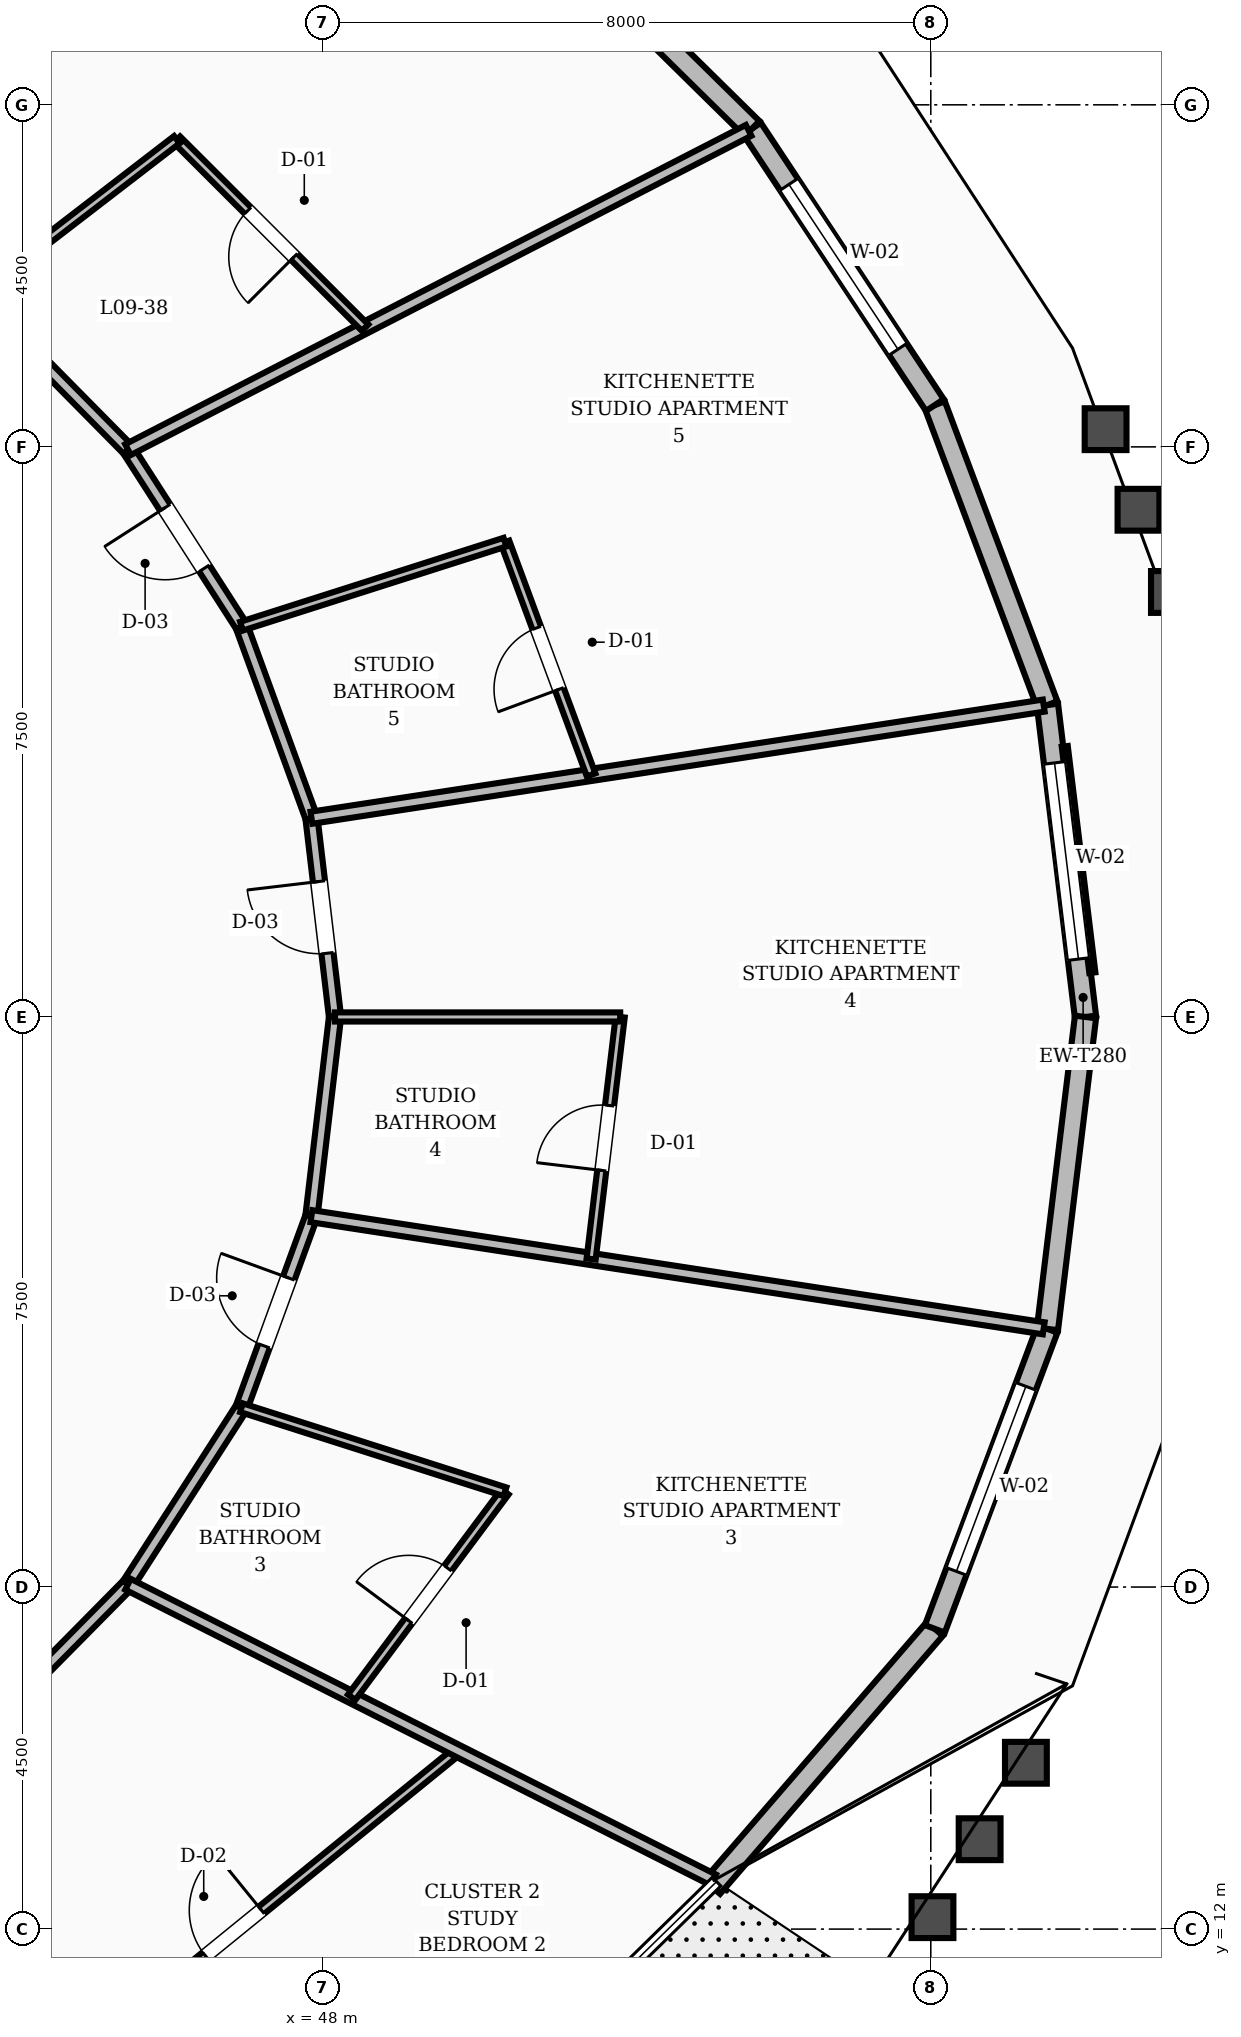
"""IFC4 building model, lengths in metres.
Left out: names, types, materials, properties, quantities, classifications, styles, units other than length and angle.
Written with IfcOpenShell. Run it as: python <this file> out.ifc"""

import sys

from ifc_helpers import new_model, si_unit, direction, frame, frame_2d, origin, place, context, subcontext, project, spatial, rectangle, extrude, element, fill, save


model = new_model("IFC4")
c1 = context("Model", 3, precision=1e-05, world=origin(), true_north=direction((0.0, 1.0)))
c2 = subcontext(c1, "Body", "Model", "MODEL_VIEW")
j1 = project(units=[si_unit("LENGTHUNIT", "METRE"), si_unit("PLANEANGLEUNIT", "RADIAN")], contexts=[c1])
p1 = place(None, origin())
s1 = spatial("IfcSite", under=j1, at=p1, CompositionType="ELEMENT")
p2 = place(p1, origin())
s2 = spatial("IfcBuilding", under=s1, at=p2, CompositionType="ELEMENT")
p3 = place(p2, frame((0.0, 0.0, 41.2)))
s3 = spatial("IfcBuildingStorey", under=s2, at=p3, CompositionType="ELEMENT", Elevation=41.2)
p4 = place(p3, frame((58.035, 24.0, 0.0), z_axis=(0.0, 0.0, 1.0), x_axis=(-0.121003282019, 0.992652107105, 0.0)))
e1 = element("IfcWall", 1, at=p4, inside=s3, PredefinedType="STANDARD", context=c2, shape_type="SweptSolid", body=[
    extrude(rectangle(XDim=4.134, YDim=0.28, at=frame_2d((2.067, 0.0))), origin(), (0.0, 0.0, 1.0), 2.65),
])
p5 = place(p4, frame((0.767, 0.0, 0.8)))
e2 = element("IfcOpeningElement", 2, at=p5, cuts=e1, PredefinedType="OPENING", context=c2, shape_type="SweptSolid", body=[
    extrude(rectangle(XDim=2.6, YDim=1.65, at=frame_2d((1.3, 0.825))), frame((0.0, 0.15, 0.0), z_axis=(0.0, -1.0, 0.0), x_axis=(1.0, 0.0, 0.0)), (0.0, 0.0, 1.0), 0.3),
])
p6 = place(p3, frame((57.535, 28.104, 0.0), z_axis=(0.0, 0.0, 1.0), x_axis=(-0.351472537915, 0.936198192207, 0.0)))
e3 = element("IfcWall", 3, at=p6, inside=s3, PredefinedType="STANDARD", context=c2, shape_type="SweptSolid", body=[
    extrude(rectangle(XDim=4.215, YDim=0.28, at=frame_2d((2.107, 0.0))), origin(), (0.0, 0.0, 1.0), 2.65),
])
p7 = place(p3, frame((56.054, 32.05, 0.0), z_axis=(0.0, 0.0, 1.0), x_axis=(-0.551763829148, 0.834000405782, 0.0)))
e4 = element("IfcWall", 4, at=p7, inside=s3, PredefinedType="STANDARD", context=c2, shape_type="SweptSolid", body=[
    extrude(rectangle(XDim=4.361, YDim=0.28, at=frame_2d((2.18, 0.0))), origin(), (0.0, 0.0, 1.0), 2.65),
])
p8 = place(p7, frame((0.88, 0.0, 0.8)))
e5 = element("IfcOpeningElement", 5, at=p8, cuts=e4, PredefinedType="OPENING", context=c2, shape_type="SweptSolid", body=[
    extrude(rectangle(XDim=2.6, YDim=1.65, at=frame_2d((1.3, 0.825))), frame((0.0, 0.15, 0.0), z_axis=(0.0, -1.0, 0.0), x_axis=(1.0, 0.0, 0.0)), (0.0, 0.0, 1.0), 0.3),
])
p9 = place(p3, frame((53.648, 35.687, 0.0), z_axis=(0.0, 0.0, 1.0), x_axis=(-0.712592855148, 0.701577809506, 0.0)))
e6 = element("IfcWall", 6, at=p9, inside=s3, PredefinedType="STANDARD", context=c2, shape_type="SweptSolid", body=[
    extrude(rectangle(XDim=4.544, YDim=0.28, at=frame_2d((2.272, 0.0))), origin(), (0.0, 0.0, 1.0), 2.65),
])
p10 = place(p3, frame((53.122, 12.555, 0.0), z_axis=(0.0, 0.0, 1.0), x_axis=(0.653570276047, 0.756865836372, 0.0)))
e7 = element("IfcWall", 7, at=p10, inside=s3, PredefinedType="STANDARD", context=c2, shape_type="SweptSolid", body=[
    extrude(rectangle(XDim=4.486, YDim=0.28, at=frame_2d((2.243, 0.0))), origin(), (0.0, 0.0, 1.0), 2.65),
])
p11 = place(p3, frame((56.054, 15.95, 0.0), z_axis=(0.0, 0.0, 1.0), x_axis=(0.351472537915, 0.936198192207, 0.0)))
e8 = element("IfcWall", 8, at=p11, inside=s3, PredefinedType="STANDARD", context=c2, shape_type="SweptSolid", body=[
    extrude(rectangle(XDim=4.215, YDim=0.28, at=frame_2d((2.107, 0.0))), origin(), (0.0, 0.0, 1.0), 2.65),
])
p12 = place(p11, frame((0.808, 0.0, 0.8)))
e9 = element("IfcOpeningElement", 9, at=p12, cuts=e8, PredefinedType="OPENING", context=c2, shape_type="SweptSolid", body=[
    extrude(rectangle(XDim=2.6, YDim=1.65, at=frame_2d((1.3, 0.825))), frame((0.0, 0.15, 0.0), z_axis=(0.0, -1.0, 0.0), x_axis=(1.0, 0.0, 0.0)), (0.0, 0.0, 1.0), 0.3),
])
p13 = place(p3, frame((57.535, 19.896, 0.0), z_axis=(0.0, 0.0, 1.0), x_axis=(0.121003282019, 0.992652107105, 0.0)))
e10 = element("IfcWall", 10, at=p13, inside=s3, PredefinedType="STANDARD", context=c2, shape_type="SweptSolid", body=[
    extrude(rectangle(XDim=4.134, YDim=0.28, at=frame_2d((2.067, 0.0))), origin(), (0.0, 0.0, 1.0), 2.65),
])
p14 = place(p3, frame((48.162, 24.0, 0.0), z_axis=(0.0, 0.0, 1.0), x_axis=(-0.117667763342, 0.993053018459, 0.0)))
e11 = element("IfcWall", 11, at=p14, inside=s3, PredefinedType="SOLIDWALL", context=c2, shape_type="SweptSolid", body=[
    extrude(rectangle(XDim=2.639, YDim=0.16, at=frame_2d((1.32, 0.0))), origin(), (0.0, 0.0, 1.0), 2.61),
])
p15 = place(p14, frame((0.844, 0.0, 0.0)))
e12 = element("IfcOpeningElement", 12, at=p15, cuts=e11, PredefinedType="OPENING", context=c2, shape_type="SweptSolid", body=[
    extrude(rectangle(XDim=0.95, YDim=2.1, at=frame_2d((0.475, 1.05))), frame((0.0, 0.09, 0.0), z_axis=(0.0, -1.0, 0.0), x_axis=(1.0, 0.0, 0.0)), (0.0, 0.0, 1.0), 0.18),
])
p16 = place(p3, frame((47.852, 26.621, 0.0), z_axis=(0.0, 0.0, 1.0), x_axis=(-0.342882618672, 0.939378257047, 0.0)))
e13 = element("IfcWall", 13, at=p16, inside=s3, PredefinedType="SOLIDWALL", context=c2, shape_type="SweptSolid", body=[
    extrude(rectangle(XDim=2.683, YDim=0.16, at=frame_2d((1.341, 0.0))), origin(), (0.0, 0.0, 1.0), 2.61),
])
p17 = place(p3, frame((46.932, 29.141, 0.0), z_axis=(0.0, 0.0, 1.0), x_axis=(-0.540891657444, 0.841092274907, 0.0)))
e14 = element("IfcWall", 14, at=p17, inside=s3, PredefinedType="SOLIDWALL", context=c2, shape_type="SweptSolid", body=[
    extrude(rectangle(XDim=2.761, YDim=0.16, at=frame_2d((1.38, 0.0))), origin(), (0.0, 0.0, 1.0), 2.61),
])
p18 = place(p17, frame((0.906, 0.0, 0.0)))
e15 = element("IfcOpeningElement", 15, at=p18, cuts=e14, PredefinedType="OPENING", context=c2, shape_type="SweptSolid", body=[
    extrude(rectangle(XDim=0.95, YDim=2.1, at=frame_2d((0.475, 1.05))), frame((0.0, 0.09, 0.0), z_axis=(0.0, -1.0, 0.0), x_axis=(1.0, 0.0, 0.0)), (0.0, 0.0, 1.0), 0.18),
])
for number, where, z_axis, x_axis in (
    (16, (45.438, 31.463, 0.0), (0.0, 0.0, 1.0), (-0.703, 0.712, 0.0)),
    (17, (43.428, 14.501, 0.0), (0.0, 0.0, 1.0), (0.703, 0.712, 0.0)),
):
    element("IfcWall", number, at=place(p3, frame(where, z_axis=z_axis, x_axis=x_axis)), inside=s3, PredefinedType="SOLIDWALL", context=c2, shape_type="SweptSolid", body=[
        extrude(rectangle(XDim=2.861, YDim=0.16, at=frame_2d((1.43, 0.0))), origin(), (0.0, 0.0, 1.0), 2.61),
    ])
p19 = place(p3, frame((45.438, 16.537, 0.0), z_axis=(0.0, 0.0, 1.0), x_axis=(0.540891657444, 0.841092274907, 0.0)))
e18 = element("IfcWall", 18, at=p19, inside=s3, PredefinedType="SOLIDWALL", context=c2, shape_type="SweptSolid", body=[
    extrude(rectangle(XDim=2.761, YDim=0.16, at=frame_2d((1.38, 0.0))), origin(), (0.0, 0.0, 1.0), 2.61),
])
p20 = place(p3, frame((46.932, 18.859, 0.0), z_axis=(0.0, 0.0, 1.0), x_axis=(0.342882618672, 0.939378257047, 0.0)))
e19 = element("IfcWall", 19, at=p20, inside=s3, PredefinedType="SOLIDWALL", context=c2, shape_type="SweptSolid", body=[
    extrude(rectangle(XDim=2.683, YDim=0.16, at=frame_2d((1.341, 0.0))), origin(), (0.0, 0.0, 1.0), 2.61),
])
p21 = place(p20, frame((0.866, 0.0, 0.0)))
e20 = element("IfcOpeningElement", 20, at=p21, cuts=e19, PredefinedType="OPENING", context=c2, shape_type="SweptSolid", body=[
    extrude(rectangle(XDim=0.95, YDim=2.1, at=frame_2d((0.475, 1.05))), frame((0.0, 0.09, 0.0), z_axis=(0.0, -1.0, 0.0), x_axis=(1.0, 0.0, 0.0)), (0.0, 0.0, 1.0), 0.18),
])
p22 = place(p3, frame((47.852, 21.379, 0.0), z_axis=(0.0, 0.0, 1.0), x_axis=(0.117667763342, 0.993053018459, 0.0)))
e21 = element("IfcWall", 21, at=p22, inside=s3, PredefinedType="SOLIDWALL", context=c2, shape_type="SweptSolid", body=[
    extrude(rectangle(XDim=2.639, YDim=0.16, at=frame_2d((1.32, 0.0))), origin(), (0.0, 0.0, 1.0), 2.61),
])
p23 = place(p3, frame((43.877, 9.552, 0.0), z_axis=(0.0, 0.0, 1.0), x_axis=(0.775978393893, 0.630759488404, 0.0)))
e22 = element("IfcWall", 22, at=p23, inside=s3, PredefinedType="PARTITIONING", context=c2, shape_type="SweptSolid", body=[
    extrude(rectangle(XDim=7.601, YDim=0.12, at=frame_2d((3.8, 0.0))), origin(), (0.0, 0.0, 1.0), 2.61),
])
p24 = place(p23, frame((3.325, 0.0, 0.0)))
e23 = element("IfcOpeningElement", 23, at=p24, cuts=e22, PredefinedType="OPENING", context=c2, shape_type="SweptSolid", body=[
    extrude(rectangle(XDim=0.95, YDim=2.1, at=frame_2d((0.475, 1.05))), frame((0.0, 0.07, 0.0), z_axis=(0.0, -1.0, 0.0), x_axis=(1.0, 0.0, 0.0)), (0.0, 0.0, 1.0), 0.14),
])
p25 = place(p3, frame((45.438, 16.537, 0.0), z_axis=(0.0, 0.0, 1.0), x_axis=(0.892562807144, -0.450923092448, 0.0)))
e24 = element("IfcWall", 24, at=p25, inside=s3, PredefinedType="SOLIDWALL", context=c2, shape_type="SweptSolid", body=[
    extrude(rectangle(XDim=8.626, YDim=0.16, at=frame_2d((4.313, 0.0))), origin(), (0.0, 0.0, 1.0), 2.61),
])
p26 = place(p3, frame((48.381, 15.05, 0.0), z_axis=(0.0, 0.0, 1.0), x_axis=(0.597948418231, 0.801534583867, 0.0)))
e25 = element("IfcWall", 25, at=p26, inside=s3, PredefinedType="PARTITIONING", context=c2, shape_type="SweptSolid", body=[
    extrude(rectangle(XDim=3.373, YDim=0.12, at=frame_2d((1.687, 0.0))), origin(), (0.0, 0.0, 1.0), 2.61),
])
p27 = place(p26, frame((1.257, 0.0, 0.0)))
e26 = element("IfcOpeningElement", 26, at=p27, cuts=e25, PredefinedType="OPENING", context=c2, shape_type="SweptSolid", body=[
    extrude(rectangle(XDim=0.86, YDim=2.1, at=frame_2d((0.43, 1.05))), frame((0.0, 0.07, 0.0), z_axis=(0.0, -1.0, 0.0), x_axis=(1.0, 0.0, 0.0)), (0.0, 0.0, 1.0), 0.14),
])
p28 = place(p3, frame((46.932, 18.859, 0.0), z_axis=(0.0, 0.0, 1.0), x_axis=(0.952742297431, -0.303779714077, 0.0)))
e27 = element("IfcWall", 27, at=p28, inside=s3, PredefinedType="PARTITIONING", context=c2, shape_type="SweptSolid", body=[
    extrude(rectangle(XDim=3.638, YDim=0.12, at=frame_2d((1.819, 0.0))), origin(), (0.0, 0.0, 1.0), 2.61),
])
p29 = place(p3, frame((47.852, 21.379, 0.0), z_axis=(0.0, 0.0, 1.0), x_axis=(0.988476582303, -0.151373862468, 0.0)))
e28 = element("IfcWall", 28, at=p29, inside=s3, PredefinedType="SOLIDWALL", context=c2, shape_type="SweptSolid", body=[
    extrude(rectangle(XDim=9.746, YDim=0.16, at=frame_2d((4.873, 0.0))), origin(), (0.0, 0.0, 1.0), 2.61),
])
p30 = place(p3, frame((51.531, 20.816, 0.0), z_axis=(0.0, 0.0, 1.0), x_axis=(0.11928329579, 0.992860259727, 0.0)))
e29 = element("IfcWall", 29, at=p30, inside=s3, PredefinedType="PARTITIONING", context=c2, shape_type="SweptSolid", body=[
    extrude(rectangle(XDim=3.207, YDim=0.12, at=frame_2d((1.604, 0.0))), origin(), (0.0, 0.0, 1.0), 2.61),
])
p31 = place(p30, frame((1.174, 0.0, 0.0)))
e30 = element("IfcOpeningElement", 30, at=p31, cuts=e29, PredefinedType="OPENING", context=c2, shape_type="SweptSolid", body=[
    extrude(rectangle(XDim=0.86, YDim=2.1, at=frame_2d((0.43, 1.05))), frame((0.0, 0.07, 0.0), z_axis=(0.0, -1.0, 0.0), x_axis=(1.0, 0.0, 0.0)), (0.0, 0.0, 1.0), 0.14),
])
p32 = place(p3, frame((48.162, 24.0, 0.0), z_axis=(0.0, 0.0, 1.0), x_axis=(1.0, 0.0, 0.0)))
e31 = element("IfcWall", 31, at=p32, inside=s3, PredefinedType="PARTITIONING", context=c2, shape_type="SweptSolid", body=[
    extrude(rectangle(XDim=3.752, YDim=0.12, at=frame_2d((1.876, 0.0))), origin(), (0.0, 0.0, 1.0), 2.61),
])
p33 = place(p3, frame((47.852, 26.621, 0.0), z_axis=(0.0, 0.0, 1.0), x_axis=(0.988476582303, 0.151373862468, 0.0)))
e32 = element("IfcWall", 32, at=p33, inside=s3, PredefinedType="SOLIDWALL", context=c2, shape_type="SweptSolid", body=[
    extrude(rectangle(XDim=9.746, YDim=0.16, at=frame_2d((4.873, 0.0))), origin(), (0.0, 0.0, 1.0), 2.61),
])
p34 = place(p3, frame((51.531, 27.184, 0.0), z_axis=(0.0, 0.0, 1.0), x_axis=(-0.347104905391, 0.937826308361, 0.0)))
e33 = element("IfcWall", 33, at=p34, inside=s3, PredefinedType="PARTITIONING", context=c2, shape_type="SweptSolid", body=[
    extrude(rectangle(XDim=3.265, YDim=0.12, at=frame_2d((1.632, 0.0))), origin(), (0.0, 0.0, 1.0), 2.61),
])
p35 = place(p34, frame((1.203, 0.0, 0.0)))
e34 = element("IfcOpeningElement", 34, at=p35, cuts=e33, PredefinedType="OPENING", context=c2, shape_type="SweptSolid", body=[
    extrude(rectangle(XDim=0.86, YDim=2.1, at=frame_2d((0.43, 1.05))), frame((0.0, 0.07, 0.0), z_axis=(0.0, -1.0, 0.0), x_axis=(1.0, 0.0, 0.0)), (0.0, 0.0, 1.0), 0.14),
])
p36 = place(p3, frame((46.932, 29.141, 0.0), z_axis=(0.0, 0.0, 1.0), x_axis=(0.952742297431, 0.303779714077, 0.0)))
e35 = element("IfcWall", 35, at=p36, inside=s3, PredefinedType="PARTITIONING", context=c2, shape_type="SweptSolid", body=[
    extrude(rectangle(XDim=3.638, YDim=0.12, at=frame_2d((1.819, 0.0))), origin(), (0.0, 0.0, 1.0), 2.61),
])
p37 = place(p3, frame((45.438, 31.463, 0.0), z_axis=(0.0, 0.0, 1.0), x_axis=(0.889225689498, 0.45746876739, 0.0)))
e36 = element("IfcWall", 36, at=p37, inside=s3, PredefinedType="SOLIDWALL", context=c2, shape_type="SweptSolid", body=[
    extrude(rectangle(XDim=9.182, YDim=0.16, at=frame_2d((4.591, 0.0))), origin(), (0.0, 0.0, 1.0), 2.61),
])
p38 = place(p3, frame((48.558, 33.068, 0.0), z_axis=(0.0, 0.0, 1.0), x_axis=(-0.707560021101, 0.706653250569, 0.0)))
e37 = element("IfcWall", 37, at=p38, inside=s3, PredefinedType="PARTITIONING", context=c2, shape_type="SweptSolid", body=[
    extrude(rectangle(XDim=3.5, YDim=0.12, at=frame_2d((1.75, 0.0))), origin(), (0.0, 0.0, 1.0), 2.61),
])
p39 = place(p38, frame((1.32, 0.0, 0.0)))
e38 = element("IfcOpeningElement", 38, at=p39, cuts=e37, PredefinedType="OPENING", context=c2, shape_type="SweptSolid", body=[
    extrude(rectangle(XDim=0.86, YDim=2.1, at=frame_2d((0.43, 1.05))), frame((0.0, 0.07, 0.0), z_axis=(0.0, -1.0, 0.0), x_axis=(1.0, 0.0, 0.0)), (0.0, 0.0, 1.0), 0.14),
])
p40 = place(p3, frame((43.428, 33.499, 0.0), z_axis=(0.0, 0.0, 1.0), x_axis=(0.792385390658, 0.61002081331, 0.0)))
e39 = element("IfcWall", 39, at=p40, inside=s3, PredefinedType="PARTITIONING", context=c2, shape_type="SweptSolid", body=[
    extrude(rectangle(XDim=3.348, YDim=0.12, at=frame_2d((1.674, 0.0))), origin(), (0.0, 0.0, 1.0), 2.61),
])
p41 = place(p3, frame((40.979, 35.17, 0.0), z_axis=(0.0, 0.0, 1.0), x_axis=(0.655467806581, 0.755223115732, 0.0)))
e40 = element("IfcWall", 40, at=p41, inside=s3, PredefinedType="SOLIDWALL", context=c2, shape_type="SweptSolid", body=[
    extrude(rectangle(XDim=8.319, YDim=0.16, at=frame_2d((4.159, 0.0))), origin(), (0.0, 0.0, 1.0), 2.61),
])
p42 = place(p5, origin())
e41 = element("IfcWindow", 41, at=p42, inside=s3, PartitioningType="SINGLE_PANEL", PredefinedType="WINDOW", context=c2, shape_type="SweptSolid", body=[
    extrude(rectangle(XDim=2.6, YDim=1.65, at=frame_2d((1.3, 0.825))), frame((0.0, 0.03, 0.0), z_axis=(0.0, -1.0, 0.0), x_axis=(1.0, 0.0, 0.0)), (0.0, 0.0, 1.0), 0.06),
])
fill(e2, e41)
p43 = place(p8, origin())
e42 = element("IfcWindow", 42, at=p43, inside=s3, PartitioningType="SINGLE_PANEL", PredefinedType="WINDOW", context=c2, shape_type="SweptSolid", body=[
    extrude(rectangle(XDim=2.6, YDim=1.65, at=frame_2d((1.3, 0.825))), frame((0.0, 0.03, 0.0), z_axis=(0.0, -1.0, 0.0), x_axis=(1.0, 0.0, 0.0)), (0.0, 0.0, 1.0), 0.06),
])
fill(e5, e42)
p44 = place(p12, origin())
e43 = element("IfcWindow", 43, at=p44, inside=s3, PartitioningType="SINGLE_PANEL", PredefinedType="WINDOW", context=c2, shape_type="SweptSolid", body=[
    extrude(rectangle(XDim=2.6, YDim=1.65, at=frame_2d((1.3, 0.825))), frame((0.0, 0.03, 0.0), z_axis=(0.0, -1.0, 0.0), x_axis=(1.0, 0.0, 0.0)), (0.0, 0.0, 1.0), 0.06),
])
fill(e9, e43)
p45 = place(p24, origin())
e44 = element("IfcDoor", 44, at=p45, inside=s3, OperationType="SINGLE_SWING_RIGHT", PredefinedType="DOOR", context=c2, shape_type="SweptSolid", body=[
    extrude(rectangle(XDim=0.95, YDim=2.1, at=frame_2d((0.475, 1.05))), frame((0.0, 0.025, 0.0), z_axis=(0.0, -1.0, 0.0), x_axis=(1.0, 0.0, 0.0)), (0.0, 0.0, 1.0), 0.05),
])
fill(e23, e44)
p46 = place(p27, origin())
e45 = element("IfcDoor", 45, at=p46, inside=s3, OperationType="SINGLE_SWING_LEFT", PredefinedType="DOOR", context=c2, shape_type="SweptSolid", body=[
    extrude(rectangle(XDim=0.86, YDim=2.1, at=frame_2d((0.43, 1.05))), frame((0.0, 0.025, 0.0), z_axis=(0.0, -1.0, 0.0), x_axis=(1.0, 0.0, 0.0)), (0.0, 0.0, 1.0), 0.05),
])
fill(e26, e45)
p47 = place(p21, origin())
e46 = element("IfcDoor", 46, at=p47, inside=s3, OperationType="SINGLE_SWING_RIGHT", PredefinedType="DOOR", context=c2, shape_type="SweptSolid", body=[
    extrude(rectangle(XDim=0.95, YDim=2.1, at=frame_2d((0.475, 1.05))), frame((0.0, 0.025, 0.0), z_axis=(0.0, -1.0, 0.0), x_axis=(1.0, 0.0, 0.0)), (0.0, 0.0, 1.0), 0.05),
])
fill(e20, e46)
p48 = place(p31, origin())
e47 = element("IfcDoor", 47, at=p48, inside=s3, OperationType="SINGLE_SWING_LEFT", PredefinedType="DOOR", context=c2, shape_type="SweptSolid", body=[
    extrude(rectangle(XDim=0.86, YDim=2.1, at=frame_2d((0.43, 1.05))), frame((0.0, 0.025, 0.0), z_axis=(0.0, -1.0, 0.0), x_axis=(1.0, 0.0, 0.0)), (0.0, 0.0, 1.0), 0.05),
])
fill(e30, e47)
p49 = place(p15, origin())
e48 = element("IfcDoor", 48, at=p49, inside=s3, OperationType="SINGLE_SWING_RIGHT", PredefinedType="DOOR", context=c2, shape_type="SweptSolid", body=[
    extrude(rectangle(XDim=0.95, YDim=2.1, at=frame_2d((0.475, 1.05))), frame((0.0, 0.025, 0.0), z_axis=(0.0, -1.0, 0.0), x_axis=(1.0, 0.0, 0.0)), (0.0, 0.0, 1.0), 0.05),
])
fill(e12, e48)
p50 = place(p35, origin())
e49 = element("IfcDoor", 49, at=p50, inside=s3, OperationType="SINGLE_SWING_LEFT", PredefinedType="DOOR", context=c2, shape_type="SweptSolid", body=[
    extrude(rectangle(XDim=0.86, YDim=2.1, at=frame_2d((0.43, 1.05))), frame((0.0, 0.025, 0.0), z_axis=(0.0, -1.0, 0.0), x_axis=(1.0, 0.0, 0.0)), (0.0, 0.0, 1.0), 0.05),
])
fill(e34, e49)
p51 = place(p18, origin())
e50 = element("IfcDoor", 50, at=p51, inside=s3, OperationType="SINGLE_SWING_RIGHT", PredefinedType="DOOR", context=c2, shape_type="SweptSolid", body=[
    extrude(rectangle(XDim=0.95, YDim=2.1, at=frame_2d((0.475, 1.05))), frame((0.0, 0.025, 0.0), z_axis=(0.0, -1.0, 0.0), x_axis=(1.0, 0.0, 0.0)), (0.0, 0.0, 1.0), 0.05),
])
fill(e15, e50)
p52 = place(p39, origin())
e51 = element("IfcDoor", 51, at=p52, inside=s3, OperationType="SINGLE_SWING_LEFT", PredefinedType="DOOR", context=c2, shape_type="SweptSolid", body=[
    extrude(rectangle(XDim=0.86, YDim=2.1, at=frame_2d((0.43, 1.05))), frame((0.0, 0.025, 0.0), z_axis=(0.0, -1.0, 0.0), x_axis=(1.0, 0.0, 0.0)), (0.0, 0.0, 1.0), 0.05),
])
fill(e38, e51)
save(model, sys.argv[1])
